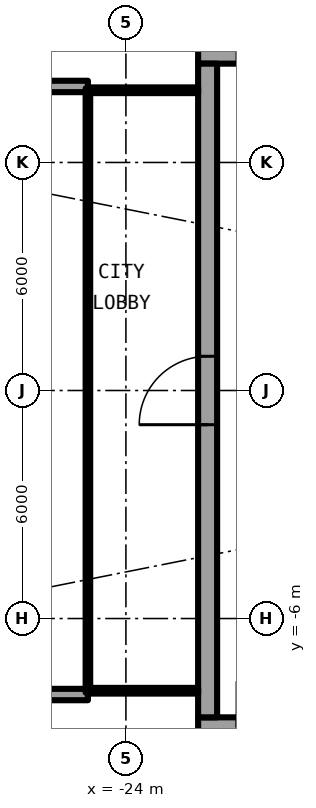
"""IFC4 building model, lengths in metres.
Left out: names, types, materials, properties, quantities, classifications, styles, units other than length and angle.
Written with IfcOpenShell. Run it as: python <this file> out.ifc"""

import sys

from ifc_helpers import new_model, si_unit, direction, frame, frame_2d, origin, place, context, subcontext, project, spatial, rectangle, extrude, element, fill, save


model = new_model("IFC4")
c1 = context("Model", 3, precision=1e-05, world=origin(), true_north=direction((0.0, 1.0)))
c2 = subcontext(c1, "Body", "Model", "MODEL_VIEW")
j1 = project(units=[si_unit("LENGTHUNIT", "METRE"), si_unit("PLANEANGLEUNIT", "RADIAN")], contexts=[c1])
p1 = place(None, origin())
s1 = spatial("IfcSite", under=j1, at=p1, CompositionType="ELEMENT")
p2 = place(p1, origin())
s2 = spatial("IfcBuilding", under=s1, at=p2, CompositionType="ELEMENT")
p3 = place(p2, frame((0.0, 0.0, 161.6)))
s3 = spatial("IfcBuildingStorey", under=s2, at=p3, CompositionType="ELEMENT", Elevation=161.6)
for number, where, z_axis, x_axis in (
    (1, (-25.0, 8.0, 0.0), (0.0, 0.0, 1.0), (-1.0, 0.0, 0.0)),
    (2, (-25.0, -8.0, 0.0), (0.0, 0.0, 1.0), (-1.0, 0.0, 0.0)),
):
    element("IfcWall", number, at=place(p3, frame(where, z_axis=z_axis, x_axis=x_axis)), inside=s3, PredefinedType="SOLIDWALL", context=c2, shape_type="SweptSolid", body=[
        extrude(rectangle(XDim=2.667, YDim=0.3, at=frame_2d((1.333, 0.0))), origin(), (0.0, 0.0, 1.0), 2.7),
    ])
p4 = place(p3, frame((-22.1, -8.85, 0.0), z_axis=(0.0, 0.0, 1.0), x_axis=(1.0, 0.0, 0.0)))
e3 = element("IfcWall", 3, at=p4, inside=s3, PredefinedType="SHEAR", context=c2, shape_type="SweptSolid", body=[
    extrude(rectangle(XDim=13.6, YDim=0.5, at=frame_2d((6.8, 0.0))), origin(), (0.0, 0.0, 1.0), 3.05),
])
p5 = place(p4, frame((1.025, 0.0, 0.0)))
e4 = element("IfcOpeningElement", 4, at=p5, cuts=e3, PredefinedType="OPENING", context=c2, shape_type="SweptSolid", body=[
    extrude(rectangle(XDim=1.2, YDim=2.3, at=frame_2d((0.6, 1.15))), frame((0.0, 0.26, 0.0), z_axis=(0.0, -1.0, 0.0), x_axis=(1.0, 0.0, 0.0)), (0.0, 0.0, 1.0), 0.52),
])
p6 = place(p3, frame((-8.5, 8.85, 0.0), z_axis=(0.0, 0.0, 1.0), x_axis=(-1.0, 0.0, 0.0)))
e5 = element("IfcWall", 5, at=p6, inside=s3, PredefinedType="SHEAR", context=c2, shape_type="SweptSolid", body=[
    extrude(rectangle(XDim=13.6, YDim=0.5, at=frame_2d((6.8, 0.0))), origin(), (0.0, 0.0, 1.0), 3.05),
])
p7 = place(p6, frame((11.375, 0.0, 0.0)))
e6 = element("IfcOpeningElement", 6, at=p7, cuts=e5, PredefinedType="OPENING", context=c2, shape_type="SweptSolid", body=[
    extrude(rectangle(XDim=1.2, YDim=2.3, at=frame_2d((0.6, 1.15))), frame((0.0, 0.26, 0.0), z_axis=(0.0, -1.0, 0.0), x_axis=(1.0, 0.0, 0.0)), (0.0, 0.0, 1.0), 0.52),
])
p8 = place(p3, frame((-21.85, -8.6, 0.0), z_axis=(0.0, 0.0, 1.0), x_axis=(0.0, 1.0, 0.0)))
e7 = element("IfcWall", 7, at=p8, inside=s3, PredefinedType="SHEAR", context=c2, shape_type="SweptSolid", body=[
    extrude(rectangle(XDim=17.2, YDim=0.5, at=frame_2d((8.6, 0.0))), origin(), (0.0, 0.0, 1.0), 3.05),
])
p9 = place(p8, frame((7.7, 0.0, 0.0)))
e8 = element("IfcOpeningElement", 8, at=p9, cuts=e7, PredefinedType="OPENING", context=c2, shape_type="SweptSolid", body=[
    extrude(rectangle(XDim=1.8, YDim=2.3, at=frame_2d((0.9, 1.15))), frame((0.0, 0.26, 0.0), z_axis=(0.0, -1.0, 0.0), x_axis=(1.0, 0.0, 0.0)), (0.0, 0.0, 1.0), 0.52),
])
for number, where, z_axis, x_axis in (
    (9, (-22.1, 7.9, 0.0), (0.0, 0.0, 1.0), (-1.0, 0.0, 0.0)),
    (10, (-22.1, -7.9, 0.0), (0.0, 0.0, 1.0), (-1.0, 0.0, 0.0)),
):
    element("IfcWall", number, at=place(p3, frame(where, z_axis=z_axis, x_axis=x_axis)), inside=s3, PredefinedType="PARTITIONING", context=c2, shape_type="SweptSolid", body=[
        extrude(rectangle(XDim=2.84, YDim=0.15, at=frame_2d((1.42, 0.0))), origin(), (0.0, 0.0, 1.0), 2.7),
    ])
p10 = place(p3, frame((-25.0, 7.95, 0.0), z_axis=(0.0, 0.0, 1.0), x_axis=(0.0, -1.0, 0.0)))
e11 = element("IfcWall", 11, at=p10, inside=s3, PredefinedType="PARTITIONING", context=c2, shape_type="SweptSolid", body=[
    extrude(rectangle(XDim=15.9, YDim=0.12, at=frame_2d((7.95, 0.0))), origin(), (0.0, 0.0, 1.0), 2.7),
])
p11 = place(p10, frame((0.95, 0.0, 0.1)))
e12 = element("IfcOpeningElement", 12, at=p11, cuts=e11, PredefinedType="OPENING", context=c2, shape_type="SweptSolid", body=[
    extrude(rectangle(XDim=14.0, YDim=2.35, at=frame_2d((7.0, 1.175))), frame((0.0, 0.07, 0.0), z_axis=(0.0, -1.0, 0.0), x_axis=(1.0, 0.0, 0.0)), (0.0, 0.0, 1.0), 0.14),
])
p12 = place(p9, origin())
e13 = element("IfcDoor", 13, at=p12, inside=s3, OperationType="SINGLE_SWING_LEFT", PredefinedType="DOOR", context=c2, shape_type="SweptSolid", body=[
    extrude(rectangle(XDim=1.8, YDim=2.3, at=frame_2d((0.9, 1.15))), frame((0.0, 0.025, 0.0), z_axis=(0.0, -1.0, 0.0), x_axis=(1.0, 0.0, 0.0)), (0.0, 0.0, 1.0), 0.05),
])
fill(e8, e13)
p13 = place(p11, origin())
e14 = element("IfcWindow", 14, at=p13, inside=s3, PartitioningType="SINGLE_PANEL", PredefinedType="WINDOW", context=c2, shape_type="SweptSolid", body=[
    extrude(rectangle(XDim=14.0, YDim=2.35, at=frame_2d((7.0, 1.175))), frame((0.0, 0.03, 0.0), z_axis=(0.0, -1.0, 0.0), x_axis=(1.0, 0.0, 0.0)), (0.0, 0.0, 1.0), 0.06),
])
fill(e12, e14)
save(model, sys.argv[1])
